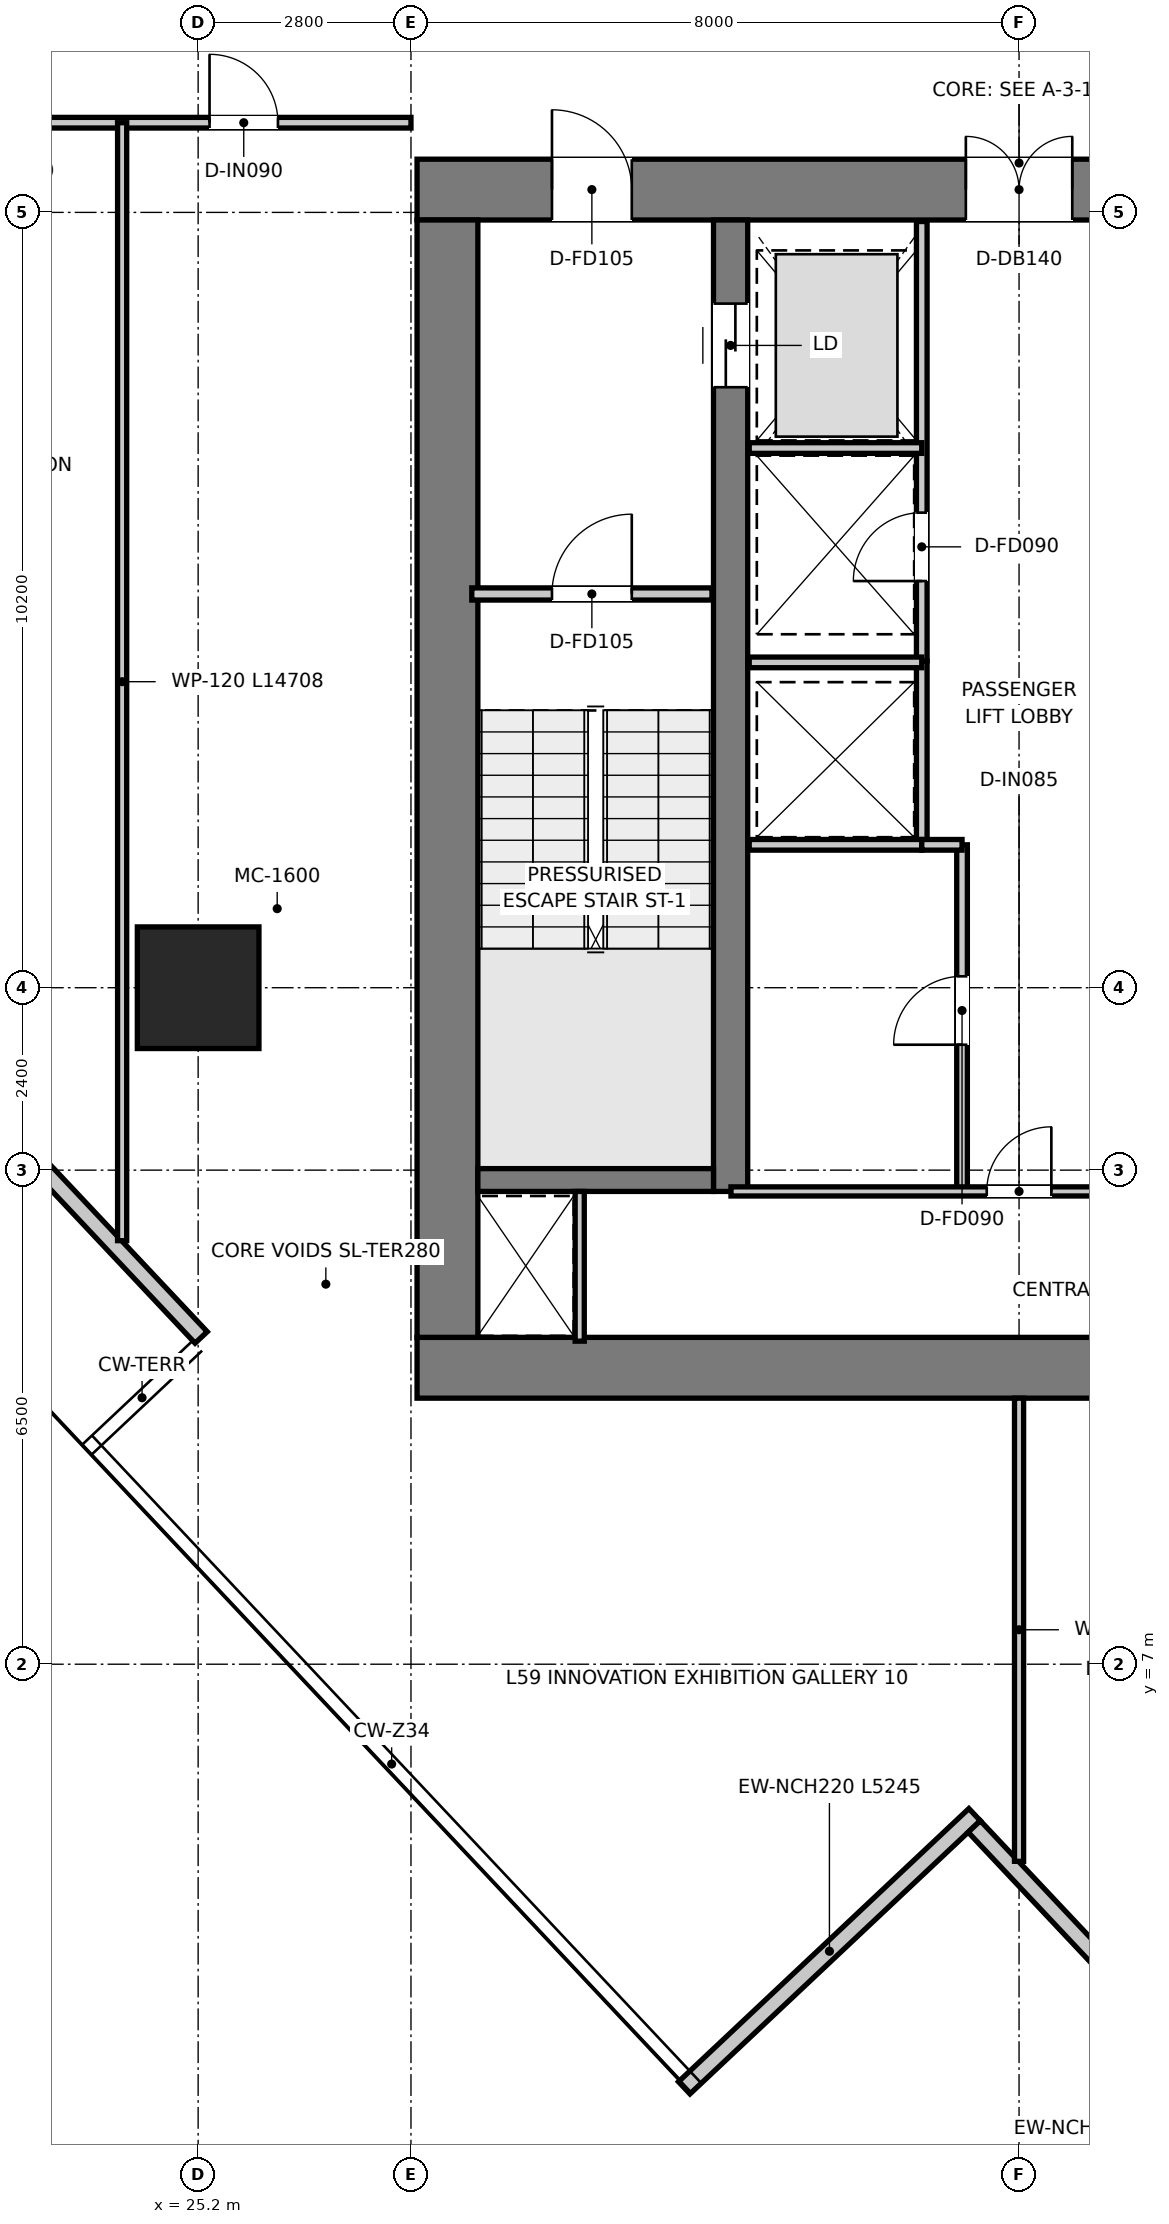
"""IFC4 building model, lengths in metres.
Left out: names, types, materials, properties, quantities, classifications, styles, units other than length and angle.
Written with IfcOpenShell. Run it as: python <this file> out.ifc"""

import sys

from ifc_helpers import new_model, si_unit, direction, frame, frame_2d, origin, origin_2d, place, context, subcontext, project, spatial, rectangle, extrude, source, transform, mapped, element, fill, save


model = new_model("IFC4")
c1 = context("Model", 3, precision=1e-05, world=origin(), true_north=direction((0.0, 1.0)))
c2 = subcontext(c1, "Body", "Model", "MODEL_VIEW")
j1 = project(units=[si_unit("LENGTHUNIT", "METRE"), si_unit("PLANEANGLEUNIT", "RADIAN")], contexts=[c1])
p1 = place(None, origin())
s1 = spatial("IfcSite", under=j1, at=p1, CompositionType="ELEMENT")
p2 = place(p1, origin())
s2 = spatial("IfcBuilding", under=s1, at=p2, CompositionType="ELEMENT")
p3 = place(p2, frame((0.0, 0.0, 242.85)))
s3 = spatial("IfcBuildingStorey", under=s2, at=p3, CompositionType="ELEMENT", Elevation=242.85)
p4 = place(p3, frame((28.08, 10.9, 0.0), z_axis=(0.0, 0.0, 1.0), x_axis=(1.0, 0.0, 0.0)))
e1 = element("IfcWall", 1, at=p4, inside=s3, PredefinedType="SHEAR", context=c2, shape_type="SweptSolid", body=[
    extrude(rectangle(XDim=15.84, YDim=0.8, at=frame_2d((7.92, 0.0))), origin(), (0.0, 0.0, 1.0), 3.95),
])
p5 = place(p3, frame((28.08, 26.4, 0.0), z_axis=(0.0, 0.0, 1.0), x_axis=(1.0, 0.0, 0.0)))
e2 = element("IfcWall", 2, at=p5, inside=s3, PredefinedType="SHEAR", context=c2, shape_type="SweptSolid", body=[
    extrude(rectangle(XDim=15.84, YDim=0.8, at=frame_2d((7.92, 0.0))), origin(), (0.0, 0.0, 1.0), 3.95),
])
p6 = place(p5, frame((7.22, 0.0, 0.0)))
e3 = element("IfcOpeningElement", 3, at=p6, cuts=e2, PredefinedType="OPENING", context=c2, shape_type="SweptSolid", body=[
    extrude(rectangle(XDim=1.4, YDim=2.2, at=frame_2d((0.7, 1.1))), frame((0.0, 0.41, 0.0), z_axis=(0.0, -1.0, 0.0), x_axis=(1.0, 0.0, 0.0)), (0.0, 0.0, 1.0), 0.82),
])
p7 = place(p5, frame((1.775, 0.0, 0.0)))
e4 = element("IfcOpeningElement", 4, at=p7, cuts=e2, PredefinedType="OPENING", context=c2, shape_type="SweptSolid", body=[
    extrude(rectangle(XDim=1.05, YDim=2.1, at=frame_2d((0.525, 1.05))), frame((0.0, 0.41, 0.0), z_axis=(0.0, -1.0, 0.0), x_axis=(1.0, 0.0, 0.0)), (0.0, 0.0, 1.0), 0.82),
])
p8 = place(p5, frame((13.015, 0.0, 0.0)))
e5 = element("IfcOpeningElement", 5, at=p8, cuts=e2, PredefinedType="OPENING", context=c2, shape_type="SweptSolid", body=[
    extrude(rectangle(XDim=1.05, YDim=2.1, at=frame_2d((0.525, 1.05))), frame((0.0, 0.41, 0.0), z_axis=(0.0, -1.0, 0.0), x_axis=(1.0, 0.0, 0.0)), (0.0, 0.0, 1.0), 0.82),
])
p9 = place(p3, frame((28.48, 11.3, 0.0), z_axis=(0.0, 0.0, 1.0), x_axis=(0.0, 1.0, 0.0)))
e6 = element("IfcWall", 6, at=p9, inside=s3, PredefinedType="SHEAR", context=c2, shape_type="SweptSolid", body=[
    extrude(rectangle(XDim=14.7, YDim=0.8, at=frame_2d((7.35, 0.0))), origin(), (0.0, 0.0, 1.0), 3.95),
])
p10 = place(p3, frame((32.205, 13.22, 0.0), z_axis=(0.0, 0.0, 1.0), x_axis=(0.0, 1.0, 0.0)))
e7 = element("IfcWall", 7, at=p10, inside=s3, PredefinedType="SHEAR", context=c2, shape_type="SweptSolid", body=[
    extrude(rectangle(XDim=12.78, YDim=0.45, at=frame_2d((6.39, 0.0))), origin(), (0.0, 0.0, 1.0), 3.95),
])
p11 = place(p10, frame((10.58, 0.0, 0.0)))
e8 = element("IfcOpeningElement", 8, at=p11, cuts=e7, PredefinedType="OPENING", context=c2, shape_type="SweptSolid", body=[
    extrude(rectangle(XDim=1.1, YDim=2.15, at=frame_2d((0.55, 1.075))), frame((0.0, 0.235, 0.0), z_axis=(0.0, -1.0, 0.0), x_axis=(1.0, 0.0, 0.0)), (0.0, 0.0, 1.0), 0.47),
])
p12 = place(p3, frame((28.88, 13.37, 0.0), z_axis=(0.0, 0.0, 1.0), x_axis=(1.0, 0.0, 0.0)))
e9 = element("IfcWall", 9, at=p12, inside=s3, PredefinedType="SHEAR", context=c2, shape_type="SweptSolid", body=[
    extrude(rectangle(XDim=3.1, YDim=0.3, at=frame_2d((1.55, 0.0))), origin(), (0.0, 0.0, 1.0), 3.95),
])
m1 = source(origin(), c2, "Body", "SweptSolid", [
    extrude(rectangle(XDim=1.6, YDim=1.6, at=origin_2d()), origin(), (0.0, 0.0, 1.0), 3.95),
])
p13 = place(p3, frame((25.2, 15.9, 0.0), z_axis=(0.0, 0.0, 1.0), x_axis=(1.0, 0.0, 0.0)))
e10 = element("IfcColumn", 10, at=p13, inside=s3, PredefinedType="USERDEFINED", context=c2, shape_type="MappedRepresentation", body=[
    mapped(m1, transform((0.0, 0.0, 0.0), x_axis=(1.0, 0.0, 0.0), y_axis=(0.0, 1.0, 0.0), z_axis=(0.0, 0.0, 1.0), scale=1.0)),
])
p14 = place(p3, frame((25.24, 11.299, 0.0), z_axis=(0.0, 0.0, 1.0), x_axis=(-0.685172559646, 0.728380781946, 0.0)))
e11 = element("IfcWall", 11, at=p14, inside=s3, PredefinedType="ELEMENTEDWALL", context=c2, shape_type="SweptSolid", body=[
    extrude(rectangle(XDim=7.69, YDim=0.22, at=frame_2d((3.845, 0.0))), origin(), (0.0, 0.0, 1.0), 3.18),
])
p15 = place(p14, frame((3.37, 0.0, 0.0)))
e12 = element("IfcOpeningElement", 12, at=p15, cuts=e11, PredefinedType="OPENING", context=c2, shape_type="SweptSolid", body=[
    extrude(rectangle(XDim=0.95, YDim=2.1, at=frame_2d((0.475, 1.05))), frame((0.0, 0.12, 0.0), z_axis=(0.0, -1.0, 0.0), x_axis=(1.0, 0.0, 0.0)), (0.0, 0.0, 1.0), 0.24),
])
p16 = place(p3, frame((31.595, 1.427, 0.0), z_axis=(0.0, 0.0, 1.0), x_axis=(0.728374884992, 0.685178828418, 0.0)))
e13 = element("IfcWall", 13, at=p16, inside=s3, PredefinedType="ELEMENTEDWALL", context=c2, shape_type="SweptSolid", body=[
    extrude(rectangle(XDim=5.245, YDim=0.22, at=frame_2d((2.623, 0.0))), origin(), (0.0, 0.0, 1.0), 3.67),
])
p17 = place(p3, frame((35.411, 4.865, 0.0), z_axis=(0.0, 0.0, 1.0), x_axis=(0.685205552999, -0.728349744381, 0.0)))
e14 = element("IfcWall", 14, at=p17, inside=s3, PredefinedType="ELEMENTEDWALL", context=c2, shape_type="SweptSolid", body=[
    extrude(rectangle(XDim=5.025, YDim=0.22, at=frame_2d((2.512, 0.0))), origin(), (0.0, 0.0, 1.0), 3.67),
])
p18 = place(p3, frame((28.8, 21.08, 0.0), z_axis=(0.0, 0.0, 1.0), x_axis=(1.0, 0.0, 0.0)))
e15 = element("IfcWall", 15, at=p18, inside=s3, PredefinedType="PARTITIONING", context=c2, shape_type="SweptSolid", body=[
    extrude(rectangle(XDim=3.16, YDim=0.16, at=frame_2d((1.58, 0.0))), origin(), (0.0, 0.0, 1.0), 3.67),
])
p19 = place(p18, frame((1.055, 0.0, 0.0)))
e16 = element("IfcOpeningElement", 16, at=p19, cuts=e15, PredefinedType="OPENING", context=c2, shape_type="SweptSolid", body=[
    extrude(rectangle(XDim=1.05, YDim=2.1, at=frame_2d((0.525, 1.05))), frame((0.0, 0.09, 0.0), z_axis=(0.0, -1.0, 0.0), x_axis=(1.0, 0.0, 0.0)), (0.0, 0.0, 1.0), 0.18),
])
p20 = place(p3, frame((34.72, 20.2, 0.0), z_axis=(0.0, 0.0, 1.0), x_axis=(0.0, 1.0, 0.0)))
e17 = element("IfcWall", 17, at=p20, inside=s3, PredefinedType="PARTITIONING", context=c2, shape_type="SweptSolid", body=[
    extrude(rectangle(XDim=5.78, YDim=0.14, at=frame_2d((2.89, 0.0))), origin(), (0.0, 0.0, 1.0), 2.82),
])
p21 = place(p20, frame((1.05, 0.0, 0.0)))
e18 = element("IfcOpeningElement", 18, at=p21, cuts=e17, PredefinedType="OPENING", context=c2, shape_type="SweptSolid", body=[
    extrude(rectangle(XDim=0.9, YDim=2.1, at=frame_2d((0.45, 1.05))), frame((0.0, 0.08, 0.0), z_axis=(0.0, -1.0, 0.0), x_axis=(1.0, 0.0, 0.0)), (0.0, 0.0, 1.0), 0.16),
])
p22 = place(p3, frame((32.45, 23.0, 0.0), z_axis=(0.0, 0.0, 1.0), x_axis=(1.0, 0.0, 0.0)))
e19 = element("IfcWall", 19, at=p22, inside=s3, PredefinedType="PARTITIONING", context=c2, shape_type="SweptSolid", body=[
    extrude(rectangle(XDim=2.27, YDim=0.14, at=frame_2d((1.135, 0.0))), origin(), (0.0, 0.0, 1.0), 2.82),
])
p23 = place(p3, frame((34.72, 17.78, 0.0), z_axis=(0.0, 0.0, 1.0), x_axis=(0.0, 1.0, 0.0)))
e20 = element("IfcWall", 20, at=p23, inside=s3, PredefinedType="PARTITIONING", context=c2, shape_type="SweptSolid", body=[
    extrude(rectangle(XDim=2.42, YDim=0.14, at=frame_2d((1.21, 0.0))), origin(), (0.0, 0.0, 1.0), 3.67),
])
for number, where, z_axis, x_axis in (
    (21, (32.45, 17.78, 0.0), (0.0, 0.0, 1.0), (1.0, 0.0, 0.0)),
    (22, (32.45, 20.18, 0.0), (0.0, 0.0, 1.0), (1.0, 0.0, 0.0)),
):
    element("IfcWall", number, at=place(p3, frame(where, z_axis=z_axis, x_axis=x_axis)), inside=s3, PredefinedType="PARTITIONING", context=c2, shape_type="SweptSolid", body=[
        extrude(rectangle(XDim=2.27, YDim=0.14, at=frame_2d((1.135, 0.0))), origin(), (0.0, 0.0, 1.0), 3.67),
    ])
p24 = place(p3, frame((35.25, 13.22, 0.0), z_axis=(0.0, 0.0, 1.0), x_axis=(0.0, 1.0, 0.0)))
e23 = element("IfcWall", 23, at=p24, inside=s3, PredefinedType="PARTITIONING", context=c2, shape_type="SweptSolid", body=[
    extrude(rectangle(XDim=4.56, YDim=0.14, at=frame_2d((2.28, 0.0))), origin(), (0.0, 0.0, 1.0), 3.67),
])
p25 = place(p24, frame((1.93, 0.0, 0.0)))
e24 = element("IfcOpeningElement", 24, at=p25, cuts=e23, PredefinedType="OPENING", context=c2, shape_type="SweptSolid", body=[
    extrude(rectangle(XDim=0.9, YDim=2.1, at=frame_2d((0.45, 1.05))), frame((0.0, 0.08, 0.0), z_axis=(0.0, -1.0, 0.0), x_axis=(1.0, 0.0, 0.0)), (0.0, 0.0, 1.0), 0.16),
])
p26 = place(p3, frame((34.72, 17.78, 0.0), z_axis=(0.0, 0.0, 1.0), x_axis=(1.0, 0.0, 0.0)))
e25 = element("IfcWall", 25, at=p26, inside=s3, PredefinedType="PARTITIONING", context=c2, shape_type="SweptSolid", body=[
    extrude(rectangle(XDim=0.53, YDim=0.14, at=frame_2d((0.265, 0.0))), origin(), (0.0, 0.0, 1.0), 3.67),
])
p27 = place(p3, frame((30.22, 11.25, 0.0), z_axis=(0.0, 0.0, 1.0), x_axis=(0.0, 1.0, 0.0)))
e26 = element("IfcWall", 26, at=p27, inside=s3, PredefinedType="PARTITIONING", context=c2, shape_type="SweptSolid", body=[
    extrude(rectangle(XDim=1.97, YDim=0.12, at=frame_2d((0.985, 0.0))), origin(), (0.0, 0.0, 1.0), 3.67),
])
p28 = place(p3, frame((32.21, 13.22, 0.0), z_axis=(0.0, 0.0, 1.0), x_axis=(1.0, 0.0, 0.0)))
e27 = element("IfcWall", 27, at=p28, inside=s3, PredefinedType="PARTITIONING", context=c2, shape_type="SweptSolid", body=[
    extrude(rectangle(XDim=7.58, YDim=0.12, at=frame_2d((3.79, 0.0))), origin(), (0.0, 0.0, 1.0), 3.67),
])
p29 = place(p28, frame((3.365, 0.0, 0.0)))
e28 = element("IfcOpeningElement", 28, at=p29, cuts=e27, PredefinedType="OPENING", context=c2, shape_type="SweptSolid", body=[
    extrude(rectangle(XDim=0.85, YDim=2.1, at=frame_2d((0.425, 1.05))), frame((0.0, 0.07, 0.0), z_axis=(0.0, -1.0, 0.0), x_axis=(1.0, 0.0, 0.0)), (0.0, 0.0, 1.0), 0.14),
])
p30 = place(p3, frame((14.316, 27.28, 0.0), z_axis=(0.0, 0.0, 1.0), x_axis=(1.0, 0.0, 0.0)))
e29 = element("IfcWall", 29, at=p30, inside=s3, PredefinedType="PARTITIONING", context=c2, shape_type="SweptSolid", body=[
    extrude(rectangle(XDim=13.684, YDim=0.14, at=frame_2d((6.842, 0.0))), origin(), (0.0, 0.0, 1.0), 3.03),
])
p31 = place(p30, frame((0.614, 0.0, 0.0)))
e30 = element("IfcOpeningElement", 30, at=p31, cuts=e29, PredefinedType="OPENING", context=c2, shape_type="SweptSolid", body=[
    extrude(rectangle(XDim=0.9, YDim=2.1, at=frame_2d((0.45, 1.05))), frame((0.0, 0.08, 0.0), z_axis=(0.0, -1.0, 0.0), x_axis=(1.0, 0.0, 0.0)), (0.0, 0.0, 1.0), 0.16),
])
p32 = place(p30, frame((8.034, 0.0, 0.0)))
e31 = element("IfcOpeningElement", 31, at=p32, cuts=e29, PredefinedType="OPENING", context=c2, shape_type="SweptSolid", body=[
    extrude(rectangle(XDim=0.9, YDim=2.1, at=frame_2d((0.45, 1.05))), frame((0.0, 0.08, 0.0), z_axis=(0.0, -1.0, 0.0), x_axis=(1.0, 0.0, 0.0)), (0.0, 0.0, 1.0), 0.16),
])
p33 = place(p30, frame((11.034, 0.0, 0.0)))
e32 = element("IfcOpeningElement", 32, at=p33, cuts=e29, PredefinedType="OPENING", context=c2, shape_type="SweptSolid", body=[
    extrude(rectangle(XDim=0.9, YDim=2.1, at=frame_2d((0.45, 1.05))), frame((0.0, 0.08, 0.0), z_axis=(0.0, -1.0, 0.0), x_axis=(1.0, 0.0, 0.0)), (0.0, 0.0, 1.0), 0.16),
])
p34 = place(p3, frame((36.0, 4.407, 0.0), z_axis=(0.0, 0.0, 1.0), x_axis=(0.0, 1.0, 0.0)))
e33 = element("IfcWall", 33, at=p34, inside=s3, PredefinedType="PARTITIONING", context=c2, shape_type="SweptSolid", body=[
    extrude(rectangle(XDim=6.093, YDim=0.12, at=frame_2d((3.047, 0.0))), origin(), (0.0, 0.0, 1.0), 3.67),
])
p35 = place(p3, frame((24.2, 12.572, 0.0), z_axis=(0.0, 0.0, 1.0), x_axis=(0.0, 1.0, 0.0)))
e34 = element("IfcWall", 34, at=p35, inside=s3, PredefinedType="PARTITIONING", context=c2, shape_type="SweptSolid", body=[
    extrude(rectangle(XDim=14.708, YDim=0.12, at=frame_2d((7.354, 0.0))), origin(), (0.0, 0.0, 1.0), 3.18),
])
p36 = place(p19, origin())
e35 = element("IfcDoor", 35, at=p36, inside=s3, OperationType="SINGLE_SWING_RIGHT", PredefinedType="DOOR", context=c2, shape_type="SweptSolid", body=[
    extrude(rectangle(XDim=1.05, YDim=2.1, at=frame_2d((0.525, 1.05))), frame((0.0, 0.025, 0.0), z_axis=(0.0, -1.0, 0.0), x_axis=(1.0, 0.0, 0.0)), (0.0, 0.0, 1.0), 0.05),
])
fill(e16, e35)
p37 = place(p6, origin())
e36 = element("IfcDoor", 36, at=p37, inside=s3, OperationType="DOUBLE_DOOR_SINGLE_SWING", PredefinedType="DOOR", context=c2, shape_type="SweptSolid", body=[
    extrude(rectangle(XDim=1.4, YDim=2.2, at=frame_2d((0.7, 1.1))), frame((0.0, 0.025, 0.0), z_axis=(0.0, -1.0, 0.0), x_axis=(1.0, 0.0, 0.0)), (0.0, 0.0, 1.0), 0.05),
])
fill(e3, e36)
p38 = place(p7, origin())
e37 = element("IfcDoor", 37, at=p38, inside=s3, OperationType="SINGLE_SWING_LEFT", PredefinedType="DOOR", context=c2, shape_type="SweptSolid", body=[
    extrude(rectangle(XDim=1.05, YDim=2.1, at=frame_2d((0.525, 1.05))), frame((0.0, 0.025, 0.0), z_axis=(0.0, -1.0, 0.0), x_axis=(1.0, 0.0, 0.0)), (0.0, 0.0, 1.0), 0.05),
])
fill(e4, e37)
p39 = place(p11, origin())
e38 = element("IfcDoor", 38, at=p39, inside=s3, OperationType="DOUBLE_DOOR_SLIDING", PredefinedType="DOOR", context=c2, shape_type="SweptSolid", body=[
    extrude(rectangle(XDim=1.1, YDim=2.15, at=frame_2d((0.55, 1.075))), frame((0.0, 0.025, 0.0), z_axis=(0.0, -1.0, 0.0), x_axis=(1.0, 0.0, 0.0)), (0.0, 0.0, 1.0), 0.05),
])
fill(e8, e38)
p40 = place(p21, origin())
e39 = element("IfcDoor", 39, at=p40, inside=s3, OperationType="SINGLE_SWING_LEFT", PredefinedType="DOOR", context=c2, shape_type="SweptSolid", body=[
    extrude(rectangle(XDim=0.9, YDim=2.1, at=frame_2d((0.45, 1.05))), frame((0.0, 0.025, 0.0), z_axis=(0.0, -1.0, 0.0), x_axis=(1.0, 0.0, 0.0)), (0.0, 0.0, 1.0), 0.05),
])
fill(e18, e39)
p41 = place(p25, origin())
e40 = element("IfcDoor", 40, at=p41, inside=s3, OperationType="SINGLE_SWING_LEFT", PredefinedType="DOOR", context=c2, shape_type="SweptSolid", body=[
    extrude(rectangle(XDim=0.9, YDim=2.1, at=frame_2d((0.45, 1.05))), frame((0.0, 0.025, 0.0), z_axis=(0.0, -1.0, 0.0), x_axis=(1.0, 0.0, 0.0)), (0.0, 0.0, 1.0), 0.05),
])
fill(e24, e40)
p42 = place(p29, origin())
e41 = element("IfcDoor", 41, at=p42, inside=s3, OperationType="SINGLE_SWING_RIGHT", PredefinedType="DOOR", context=c2, shape_type="SweptSolid", body=[
    extrude(rectangle(XDim=0.85, YDim=2.1, at=frame_2d((0.425, 1.05))), frame((0.0, 0.025, 0.0), z_axis=(0.0, -1.0, 0.0), x_axis=(1.0, 0.0, 0.0)), (0.0, 0.0, 1.0), 0.05),
])
fill(e28, e41)
p43 = place(p33, origin())
e42 = element("IfcDoor", 42, at=p43, inside=s3, OperationType="SINGLE_SWING_LEFT", PredefinedType="DOOR", context=c2, shape_type="SweptSolid", body=[
    extrude(rectangle(XDim=0.9, YDim=2.1, at=frame_2d((0.45, 1.05))), frame((0.0, 0.025, 0.0), z_axis=(0.0, -1.0, 0.0), x_axis=(1.0, 0.0, 0.0)), (0.0, 0.0, 1.0), 0.05),
])
fill(e32, e42)
save(model, sys.argv[1])
